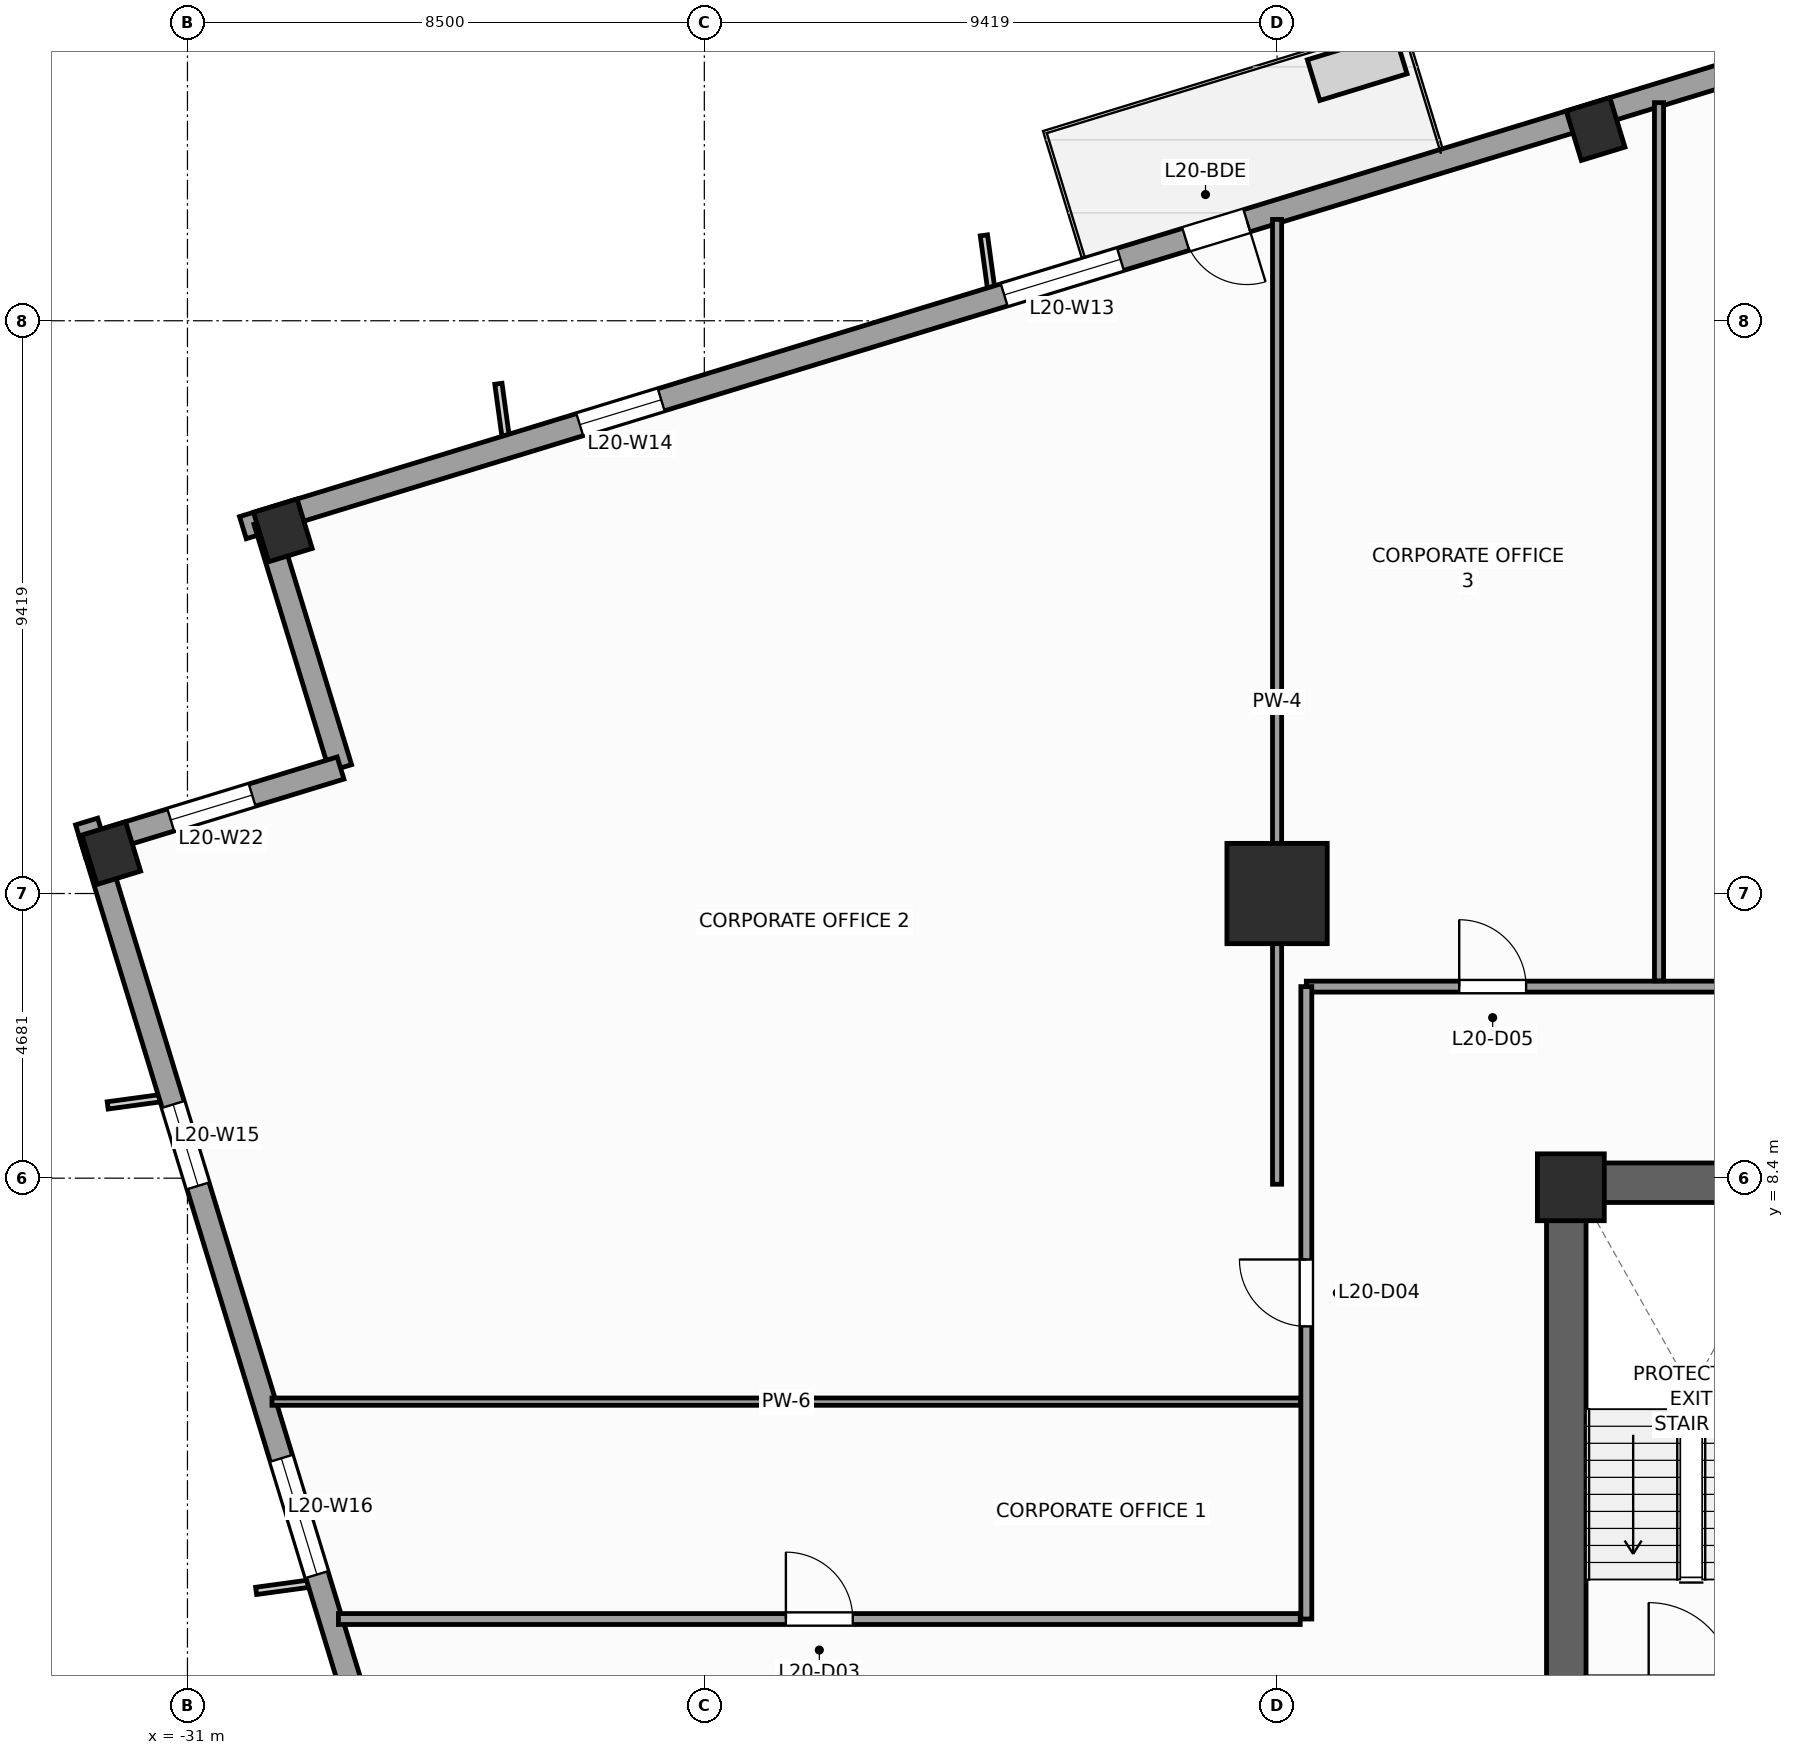
"""IFC4 building model, lengths in metres.
Left out: names, types, materials, properties, quantities, classifications, styles, units other than length and angle.
Written with IfcOpenShell. Run it as: python <this file> out.ifc"""

import sys

from ifc_helpers import new_model, si_unit, direction, frame, frame_2d, origin, origin_2d, place, context, subcontext, project, spatial, rectangle, extrude, source, transform, mapped, element, fill, save


model = new_model("IFC4")
c1 = context("Model", 3, precision=1e-05, world=origin(), true_north=direction((0.0, 1.0)))
c2 = subcontext(c1, "Body", "Model", "MODEL_VIEW")
j1 = project(units=[si_unit("LENGTHUNIT", "METRE"), si_unit("PLANEANGLEUNIT", "RADIAN")], contexts=[c1])
p1 = place(None, origin())
s1 = spatial("IfcSite", under=j1, at=p1, CompositionType="ELEMENT")
p2 = place(p1, origin())
s2 = spatial("IfcBuilding", under=s1, at=p2, CompositionType="ELEMENT")
p3 = place(p2, frame((0.0, 0.0, 87.2)))
s3 = spatial("IfcBuildingStorey", under=s2, at=p3, CompositionType="ELEMENT", Elevation=87.2)
p4 = place(p3, frame((-8.65, 8.325, 0.0), z_axis=(0.0, 0.0, 1.0), x_axis=(1.0, 0.0, 0.0)))
e1 = element("IfcWall", 1, at=p4, inside=s3, PredefinedType="SHEAR", context=c2, shape_type="SweptSolid", body=[
    extrude(rectangle(XDim=17.3, YDim=0.65, at=frame_2d((8.65, 0.0))), origin(), (0.0, 0.0, 1.0), 4.0),
])
p5 = place(p3, frame((-8.325, -8.0, 0.0), z_axis=(0.0, 0.0, 1.0), x_axis=(0.0, 1.0, 0.0)))
e2 = element("IfcWall", 2, at=p5, inside=s3, PredefinedType="SHEAR", context=c2, shape_type="SweptSolid", body=[
    extrude(rectangle(XDim=16.0, YDim=0.65, at=frame_2d((8.0, 0.0))), origin(), (0.0, 0.0, 1.0), 4.0),
])
p6 = place(p5, frame((4.69, 0.0, 0.0)))
e3 = element("IfcOpeningElement", 3, at=p6, cuts=e2, PredefinedType="OPENING", context=c2, shape_type="SweptSolid", body=[
    extrude(rectangle(XDim=1.3, YDim=2.2, at=frame_2d((0.65, 1.1))), frame((0.0, 0.335, 0.0), z_axis=(0.0, -1.0, 0.0), x_axis=(1.0, 0.0, 0.0)), (0.0, 0.0, 1.0), 0.67),
])
m1 = source(origin(), c2, "Body", "SweptSolid", [
    extrude(rectangle(XDim=1.1, YDim=1.1, at=origin_2d()), origin(), (0.0, 0.0, 1.0), 4.0),
])
p7 = place(p3, frame((-8.25, 8.25, 0.0), z_axis=(0.0, 0.0, 1.0), x_axis=(1.0, 0.0, 0.0)))
e4 = element("IfcColumn", 4, at=p7, inside=s3, PredefinedType="PILASTER", context=c2, shape_type="MappedRepresentation", body=[
    mapped(m1, transform((0.0, 0.0, 0.0), scale=1.0)),
])
m2 = source(origin(), c2, "Body", "SweptSolid", [
    extrude(rectangle(XDim=1.65, YDim=1.65, at=origin_2d()), origin(), (0.0, 0.0, 1.0), 4.0),
])
p8 = place(p3, frame((-13.081, 13.081, 0.0), z_axis=(0.0, 0.0, 1.0), x_axis=(1.0, 0.0, 0.0)))
e5 = element("IfcColumn", 5, at=p8, inside=s3, PredefinedType="COLUMN", context=c2, shape_type="MappedRepresentation", body=[
    mapped(m2, transform((0.0, 0.0, 0.0), scale=1.0)),
])
m3 = source(origin(), c2, "Body", "SweptSolid", [
    extrude(rectangle(XDim=0.75, YDim=0.85, at=origin_2d()), origin(), (0.0, 0.0, 1.0), 4.0),
])
for number, where, z_axis, x_axis in (
    (6, (-7.843, 25.653, 0.0), (0.0, 0.0, 1.0), (0.956, 0.292, 0.0)),
    (7, (-29.431, 19.052, 0.0), (0.0, 0.0, 1.0), (0.956, 0.292, 0.0)),
    (8, (-32.253, 13.746, 0.0), (0.0, 0.0, 1.0), (0.956, 0.292, 0.0)),
):
    element("IfcColumn", number, at=place(p3, frame(where, z_axis=z_axis, x_axis=x_axis)), inside=s3, PredefinedType="COLUMN", context=c2, shape_type="MappedRepresentation", body=[
        mapped(m3, transform((0.0, 0.0, 0.0), scale=1.0)),
    ])
p9 = place(p3, frame((14.265, 32.658, 0.0), z_axis=(0.0, 0.0, 1.0), x_axis=(-0.956304320851, -0.292373127906, 0.0)))
e9 = element("IfcWall", 9, at=p9, inside=s3, PredefinedType="STANDARD", context=c2, shape_type="SweptSolid", body=[
    extrude(rectangle(XDim=46.38, YDim=0.38, at=frame_2d((23.19, 0.0))), origin(), (0.0, 0.0, 1.0), 3.14),
])
p10 = place(p9, frame((29.115, 0.0, 0.0)))
e10 = element("IfcOpeningElement", 10, at=p10, cuts=e9, PredefinedType="OPENING", context=c2, shape_type="SweptSolid", body=[
    extrude(rectangle(XDim=1.05, YDim=2.25, at=frame_2d((0.525, 1.125))), frame((0.0, 0.2, 0.0), z_axis=(0.0, -1.0, 0.0), x_axis=(1.0, 0.0, 0.0)), (0.0, 0.0, 1.0), 0.4),
])
p11 = place(p9, frame((4.865, 0.0, 0.51)))
e11 = element("IfcOpeningElement", 11, at=p11, cuts=e9, PredefinedType="OPENING", context=c2, shape_type="SweptSolid", body=[
    extrude(rectangle(XDim=1.4, YDim=2.4, at=frame_2d((0.7, 1.2))), frame((0.0, 0.2, 0.0), z_axis=(0.0, -1.0, 0.0), x_axis=(1.0, 0.0, 0.0)), (0.0, 0.0, 1.0), 0.4),
])
p12 = place(p9, frame((12.45, 0.0, 0.51)))
e12 = element("IfcOpeningElement", 12, at=p12, cuts=e9, PredefinedType="OPENING", context=c2, shape_type="SweptSolid", body=[
    extrude(rectangle(XDim=2.0, YDim=2.4, at=frame_2d((1.0, 1.2))), frame((0.0, 0.2, 0.0), z_axis=(0.0, -1.0, 0.0), x_axis=(1.0, 0.0, 0.0)), (0.0, 0.0, 1.0), 0.4),
])
p13 = place(p9, frame((19.012, 0.0, 0.51)))
e13 = element("IfcOpeningElement", 13, at=p13, cuts=e9, PredefinedType="OPENING", context=c2, shape_type="SweptSolid", body=[
    extrude(rectangle(XDim=2.0, YDim=2.4, at=frame_2d((1.0, 1.2))), frame((0.0, 0.2, 0.0), z_axis=(0.0, -1.0, 0.0), x_axis=(1.0, 0.0, 0.0)), (0.0, 0.0, 1.0), 0.4),
])
p14 = place(p9, frame((31.288, 0.0, 0.51)))
e14 = element("IfcOpeningElement", 14, at=p14, cuts=e9, PredefinedType="OPENING", context=c2, shape_type="SweptSolid", body=[
    extrude(rectangle(XDim=2.0, YDim=2.4, at=frame_2d((1.0, 1.2))), frame((0.0, 0.2, 0.0), z_axis=(0.0, -1.0, 0.0), x_axis=(1.0, 0.0, 0.0)), (0.0, 0.0, 1.0), 0.4),
])
p15 = place(p9, frame((39.187, 0.0, 0.51)))
e15 = element("IfcOpeningElement", 15, at=p15, cuts=e9, PredefinedType="OPENING", context=c2, shape_type="SweptSolid", body=[
    extrude(rectangle(XDim=1.4, YDim=2.4, at=frame_2d((0.7, 1.2))), frame((0.0, 0.2, 0.0), z_axis=(0.0, -1.0, 0.0), x_axis=(1.0, 0.0, 0.0)), (0.0, 0.0, 1.0), 0.4),
])
p16 = place(p3, frame((-29.725, 19.208, 0.0), z_axis=(0.0, 0.0, 1.0), x_axis=(0.292345507338, -0.956312764915, 0.0)))
e16 = element("IfcWall", 16, at=p16, inside=s3, PredefinedType="STANDARD", context=c2, shape_type="SweptSolid", body=[
    extrude(rectangle(XDim=4.25, YDim=0.38, at=frame_2d((2.125, 0.0))), origin(), (0.0, 0.0, 1.0), 3.74),
])
p17 = place(p3, frame((-28.482, 15.144, 0.0), z_axis=(0.0, 0.0, 1.0), x_axis=(-0.956304176051, -0.292373601522, 0.0)))
e17 = element("IfcWall", 17, at=p17, inside=s3, PredefinedType="STANDARD", context=c2, shape_type="SweptSolid", body=[
    extrude(rectangle(XDim=4.44, YDim=0.38, at=frame_2d((2.22, 0.0))), origin(), (0.0, 0.0, 1.0), 3.04),
])
p18 = place(p17, frame((1.52, 0.0, 0.51)))
e18 = element("IfcOpeningElement", 18, at=p18, cuts=e17, PredefinedType="OPENING", context=c2, shape_type="SweptSolid", body=[
    extrude(rectangle(XDim=1.4, YDim=2.4, at=frame_2d((0.7, 1.2))), frame((0.0, 0.2, 0.0), z_axis=(0.0, -1.0, 0.0), x_axis=(1.0, 0.0, 0.0)), (0.0, 0.0, 1.0), 0.4),
])
p19 = place(p3, frame((-32.658, 14.265, 0.0), z_axis=(0.0, 0.0, 1.0), x_axis=(0.292373127906, -0.956304320851, 0.0)))
e19 = element("IfcWall", 19, at=p19, inside=s3, PredefinedType="STANDARD", context=c2, shape_type="SweptSolid", body=[
    extrude(rectangle(XDim=46.38, YDim=0.38, at=frame_2d((23.19, 0.0))), origin(), (0.0, 0.0, 1.0), 3.14),
])
p20 = place(p19, frame((4.865, 0.0, 0.51)))
e20 = element("IfcOpeningElement", 20, at=p20, cuts=e19, PredefinedType="OPENING", context=c2, shape_type="SweptSolid", body=[
    extrude(rectangle(XDim=1.4, YDim=2.4, at=frame_2d((0.7, 1.2))), frame((0.0, 0.2, 0.0), z_axis=(0.0, -1.0, 0.0), x_axis=(1.0, 0.0, 0.0)), (0.0, 0.0, 1.0), 0.4),
])
p21 = place(p19, frame((10.95, 0.0, 0.51)))
e21 = element("IfcOpeningElement", 21, at=p21, cuts=e19, PredefinedType="OPENING", context=c2, shape_type="SweptSolid", body=[
    extrude(rectangle(XDim=2.0, YDim=2.4, at=frame_2d((1.0, 1.2))), frame((0.0, 0.2, 0.0), z_axis=(0.0, -1.0, 0.0), x_axis=(1.0, 0.0, 0.0)), (0.0, 0.0, 1.0), 0.4),
])
p22 = place(p19, frame((19.012, 0.0, 0.51)))
e22 = element("IfcOpeningElement", 22, at=p22, cuts=e19, PredefinedType="OPENING", context=c2, shape_type="SweptSolid", body=[
    extrude(rectangle(XDim=2.0, YDim=2.4, at=frame_2d((1.0, 1.2))), frame((0.0, 0.2, 0.0), z_axis=(0.0, -1.0, 0.0), x_axis=(1.0, 0.0, 0.0)), (0.0, 0.0, 1.0), 0.4),
])
p23 = place(p19, frame((30.538, 0.0, 0.51)))
e23 = element("IfcOpeningElement", 23, at=p23, cuts=e19, PredefinedType="OPENING", context=c2, shape_type="SweptSolid", body=[
    extrude(rectangle(XDim=2.0, YDim=2.4, at=frame_2d((1.0, 1.2))), frame((0.0, 0.2, 0.0), z_axis=(0.0, -1.0, 0.0), x_axis=(1.0, 0.0, 0.0)), (0.0, 0.0, 1.0), 0.4),
])
p24 = place(p19, frame((39.187, 0.0, 0.51)))
e24 = element("IfcOpeningElement", 24, at=p24, cuts=e19, PredefinedType="OPENING", context=c2, shape_type="SweptSolid", body=[
    extrude(rectangle(XDim=1.4, YDim=2.4, at=frame_2d((0.7, 1.2))), frame((0.0, 0.2, 0.0), z_axis=(0.0, -1.0, 0.0), x_axis=(1.0, 0.0, 0.0)), (0.0, 0.0, 1.0), 0.4),
])
p25 = place(p3, frame((-12.6, 11.55, 0.0), z_axis=(0.0, 0.0, 1.0), x_axis=(1.0, 0.0, 0.0)))
e25 = element("IfcWall", 25, at=p25, inside=s3, PredefinedType="PARTITIONING", context=c2, shape_type="SweptSolid", body=[
    extrude(rectangle(XDim=23.05, YDim=0.18, at=frame_2d((11.525, 0.0))), origin(), (0.0, 0.0, 1.0), 3.74),
])
p26 = place(p25, frame((2.514, 0.0, 0.0)))
e26 = element("IfcOpeningElement", 26, at=p26, cuts=e25, PredefinedType="OPENING", context=c2, shape_type="SweptSolid", body=[
    extrude(rectangle(XDim=1.1, YDim=2.2, at=frame_2d((0.55, 1.1))), frame((0.0, 0.1, 0.0), z_axis=(0.0, -1.0, 0.0), x_axis=(1.0, 0.0, 0.0)), (0.0, 0.0, 1.0), 0.2),
])
p27 = place(p25, frame((8.05, 0.0, 0.0)))
e27 = element("IfcOpeningElement", 27, at=p27, cuts=e25, PredefinedType="OPENING", context=c2, shape_type="SweptSolid", body=[
    extrude(rectangle(XDim=1.1, YDim=2.2, at=frame_2d((0.55, 1.1))), frame((0.0, 0.1, 0.0), z_axis=(0.0, -1.0, 0.0), x_axis=(1.0, 0.0, 0.0)), (0.0, 0.0, 1.0), 0.2),
])
p28 = place(p25, frame((13.65, 0.0, 0.0)))
e28 = element("IfcOpeningElement", 28, at=p28, cuts=e25, PredefinedType="OPENING", context=c2, shape_type="SweptSolid", body=[
    extrude(rectangle(XDim=1.1, YDim=2.2, at=frame_2d((0.55, 1.1))), frame((0.0, 0.1, 0.0), z_axis=(0.0, -1.0, 0.0), x_axis=(1.0, 0.0, 0.0)), (0.0, 0.0, 1.0), 0.2),
])
p29 = place(p25, frame((19.311, 0.0, 0.0)))
e29 = element("IfcOpeningElement", 29, at=p29, cuts=e25, PredefinedType="OPENING", context=c2, shape_type="SweptSolid", body=[
    extrude(rectangle(XDim=1.1, YDim=2.2, at=frame_2d((0.55, 1.1))), frame((0.0, 0.1, 0.0), z_axis=(0.0, -1.0, 0.0), x_axis=(1.0, 0.0, 0.0)), (0.0, 0.0, 1.0), 0.2),
])
p30 = place(p3, frame((-12.6, 1.15, 0.0), z_axis=(0.0, 0.0, 1.0), x_axis=(0.0, 1.0, 0.0)))
e30 = element("IfcWall", 30, at=p30, inside=s3, PredefinedType="PARTITIONING", context=c2, shape_type="SweptSolid", body=[
    extrude(rectangle(XDim=10.4, YDim=0.18, at=frame_2d((5.2, 0.0))), origin(), (0.0, 0.0, 1.0), 3.74),
])
p31 = place(p30, frame((4.812, 0.0, 0.0)))
e31 = element("IfcOpeningElement", 31, at=p31, cuts=e30, PredefinedType="OPENING", context=c2, shape_type="SweptSolid", body=[
    extrude(rectangle(XDim=1.1, YDim=2.2, at=frame_2d((0.55, 1.1))), frame((0.0, 0.1, 0.0), z_axis=(0.0, -1.0, 0.0), x_axis=(1.0, 0.0, 0.0)), (0.0, 0.0, 1.0), 0.2),
])
p32 = place(p3, frame((-28.517, 1.15, 0.0), z_axis=(0.0, 0.0, 1.0), x_axis=(1.0, 0.0, 0.0)))
e32 = element("IfcWall", 32, at=p32, inside=s3, PredefinedType="PARTITIONING", context=c2, shape_type="SweptSolid", body=[
    extrude(rectangle(XDim=15.817, YDim=0.18, at=frame_2d((7.909, 0.0))), origin(), (0.0, 0.0, 1.0), 3.74),
])
p33 = place(p32, frame((7.359, 0.0, 0.0)))
e33 = element("IfcOpeningElement", 33, at=p33, cuts=e32, PredefinedType="OPENING", context=c2, shape_type="SweptSolid", body=[
    extrude(rectangle(XDim=1.1, YDim=2.2, at=frame_2d((0.55, 1.1))), frame((0.0, 0.1, 0.0), z_axis=(0.0, -1.0, 0.0), x_axis=(1.0, 0.0, 0.0)), (0.0, 0.0, 1.0), 0.2),
])
p34 = place(p3, frame((-13.081, 8.3, 0.0), z_axis=(0.0, 0.0, 1.0), x_axis=(0.0, 1.0, 0.0)))
e34 = element("IfcWall", 34, at=p34, inside=s3, PredefinedType="PARTITIONING", context=c2, shape_type="SweptSolid", body=[
    extrude(rectangle(XDim=15.866, YDim=0.15, at=frame_2d((7.933, 0.0))), origin(), (0.0, 0.0, 1.0), 2.732),
])
p35 = place(p3, frame((-6.8, 11.645, 0.0), z_axis=(0.0, 0.0, 1.0), x_axis=(0.0, 1.0, 0.0)))
e35 = element("IfcWall", 35, at=p35, inside=s3, PredefinedType="PARTITIONING", context=c2, shape_type="SweptSolid", body=[
    extrude(rectangle(XDim=14.442, YDim=0.15, at=frame_2d((7.221, 0.0))), origin(), (0.0, 0.0, 1.0), 3.74),
])
p36 = place(p3, frame((-29.61, 4.725, 0.0), z_axis=(0.0, 0.0, 1.0), x_axis=(1.0, 0.0, 0.0)))
e36 = element("IfcWall", 36, at=p36, inside=s3, PredefinedType="PARTITIONING", context=c2, shape_type="SweptSolid", body=[
    extrude(rectangle(XDim=16.915, YDim=0.12, at=frame_2d((8.458, 0.0))), origin(), (0.0, 0.0, 1.0), 3.74),
])
m4 = source(origin(), c2, "Body", "SweptSolid", [
    extrude(rectangle(XDim=1.05, YDim=2.25, at=frame_2d((0.525, 1.125))), frame((0.0, 0.025, 0.0), z_axis=(0.0, -1.0, 0.0), x_axis=(1.0, 0.0, 0.0)), (0.0, 0.0, 1.0), 0.05),
])
p37 = place(p10, origin())
e37 = element("IfcDoor", 37, at=p37, inside=s3, OperationType="SINGLE_SWING_LEFT", PredefinedType="DOOR", context=c2, shape_type="MappedRepresentation", body=[
    mapped(m4, transform((0.0, 0.0, 0.0), scale=1.0)),
])
fill(e10, e37)
m5 = source(origin(), c2, "Body", "SweptSolid", [
    extrude(rectangle(XDim=2.0, YDim=2.4, at=frame_2d((1.0, 1.2))), frame((0.0, 0.03, 0.0), z_axis=(0.0, -1.0, 0.0), x_axis=(1.0, 0.0, 0.0)), (0.0, 0.0, 1.0), 0.06),
])
p38 = place(p14, origin())
e38 = element("IfcWindow", 38, at=p38, inside=s3, PartitioningType="SINGLE_PANEL", PredefinedType="WINDOW", context=c2, shape_type="MappedRepresentation", body=[
    mapped(m5, transform((0.0, 0.0, 0.0), scale=1.0)),
])
fill(e14, e38)
m6 = source(origin(), c2, "Body", "SweptSolid", [
    extrude(rectangle(XDim=1.4, YDim=2.4, at=frame_2d((0.7, 1.2))), frame((0.0, 0.03, 0.0), z_axis=(0.0, -1.0, 0.0), x_axis=(1.0, 0.0, 0.0)), (0.0, 0.0, 1.0), 0.06),
])
p39 = place(p15, origin())
e39 = element("IfcWindow", 39, at=p39, inside=s3, PartitioningType="SINGLE_PANEL", PredefinedType="WINDOW", context=c2, shape_type="MappedRepresentation", body=[
    mapped(m6, transform((0.0, 0.0, 0.0), scale=1.0)),
])
fill(e15, e39)
p40 = place(p20, origin())
e40 = element("IfcWindow", 40, at=p40, inside=s3, PartitioningType="SINGLE_PANEL", PredefinedType="WINDOW", context=c2, shape_type="MappedRepresentation", body=[
    mapped(m6, transform((0.0, 0.0, 0.0), scale=1.0)),
])
fill(e20, e40)
p41 = place(p21, origin())
e41 = element("IfcWindow", 41, at=p41, inside=s3, PartitioningType="SINGLE_PANEL", PredefinedType="WINDOW", context=c2, shape_type="MappedRepresentation", body=[
    mapped(m5, transform((0.0, 0.0, 0.0), scale=1.0)),
])
fill(e21, e41)
p42 = place(p18, origin())
e42 = element("IfcWindow", 42, at=p42, inside=s3, PartitioningType="SINGLE_PANEL", PredefinedType="WINDOW", context=c2, shape_type="MappedRepresentation", body=[
    mapped(m6, transform((0.0, 0.0, 0.0), scale=1.0)),
])
fill(e18, e42)
m7 = source(origin(), c2, "Body", "SweptSolid", [
    extrude(rectangle(XDim=1.1, YDim=2.2, at=frame_2d((0.55, 1.1))), frame((0.0, 0.025, 0.0), z_axis=(0.0, -1.0, 0.0), x_axis=(1.0, 0.0, 0.0)), (0.0, 0.0, 1.0), 0.05),
])
p43 = place(p33, origin())
e43 = element("IfcDoor", 43, at=p43, inside=s3, OperationType="SINGLE_SWING_LEFT", PredefinedType="DOOR", context=c2, shape_type="MappedRepresentation", body=[
    mapped(m7, transform((0.0, 0.0, 0.0), scale=1.0)),
])
fill(e33, e43)
p44 = place(p31, origin())
e44 = element("IfcDoor", 44, at=p44, inside=s3, OperationType="SINGLE_SWING_RIGHT", PredefinedType="DOOR", context=c2, shape_type="MappedRepresentation", body=[
    mapped(m7, transform((0.0, 0.0, 0.0), scale=1.0)),
])
fill(e31, e44)
p45 = place(p26, origin())
e45 = element("IfcDoor", 45, at=p45, inside=s3, OperationType="SINGLE_SWING_LEFT", PredefinedType="DOOR", context=c2, shape_type="MappedRepresentation", body=[
    mapped(m7, transform((0.0, 0.0, 0.0), scale=1.0)),
])
fill(e26, e45)
save(model, sys.argv[1])
